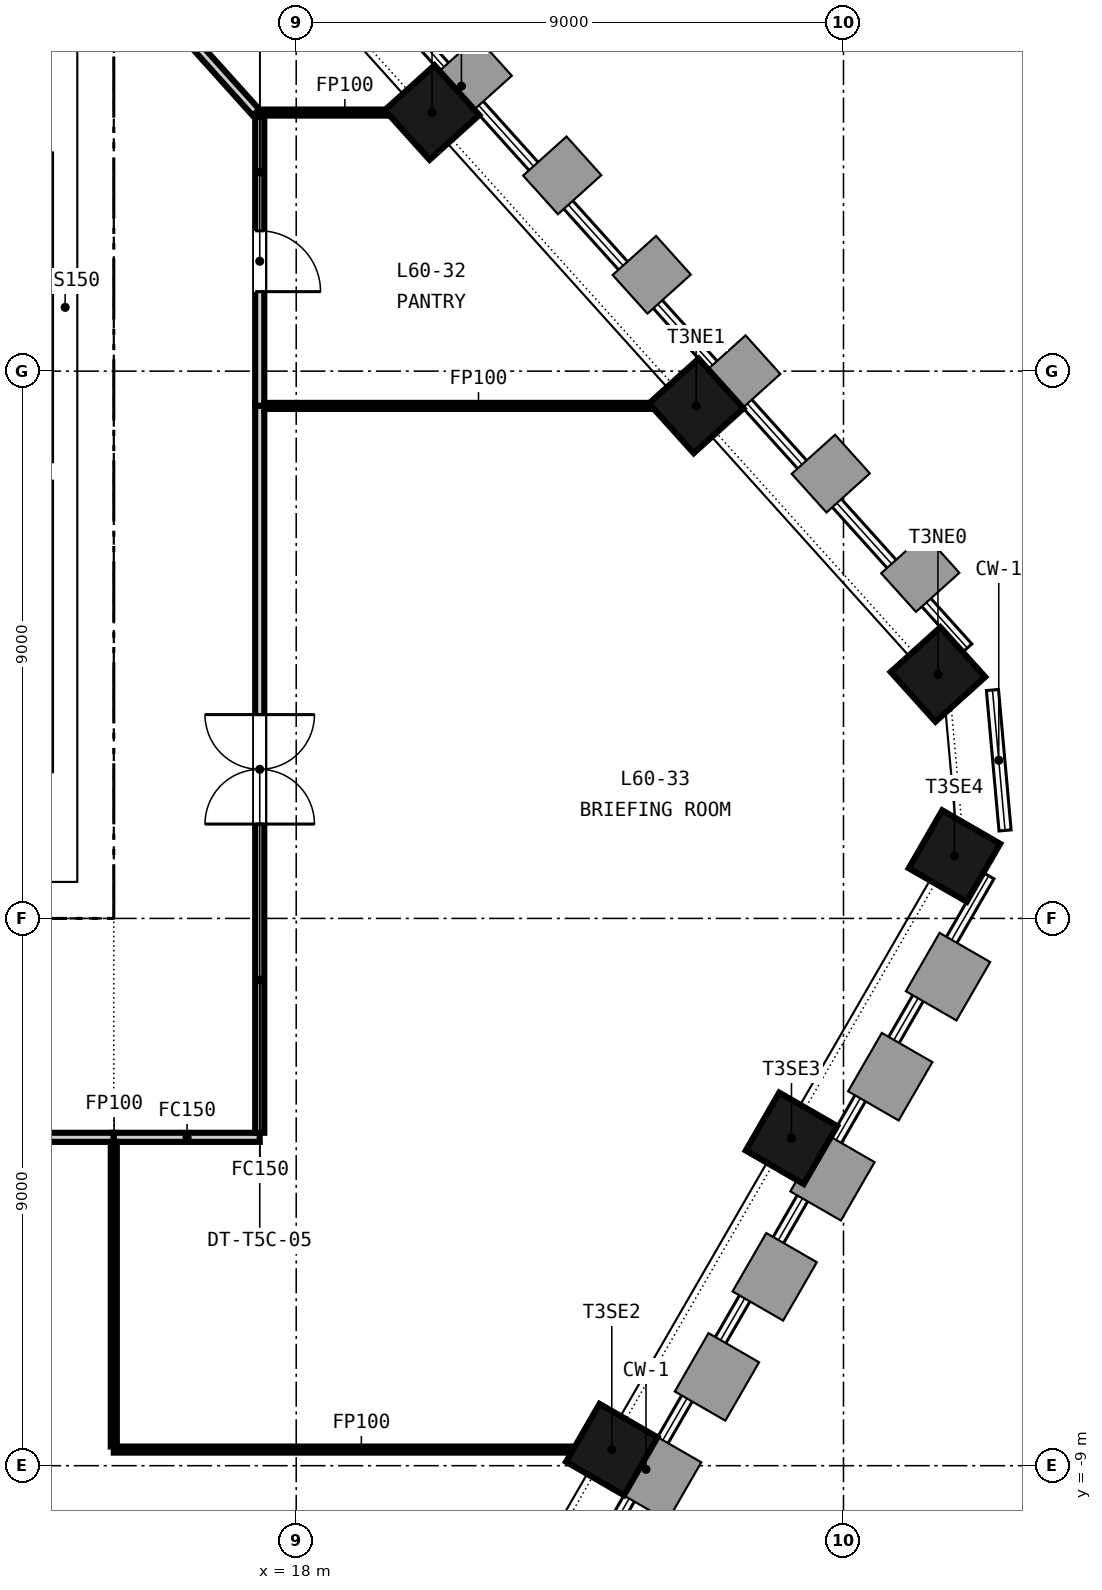
"""IFC4 building model, lengths in metres.
Left out: names, types, materials, properties, quantities, classifications, styles, units other than length and angle.
Written with IfcOpenShell. Run it as: python <this file> out.ifc"""

import sys

from ifc_helpers import new_model, si_unit, direction, frame, frame_2d, origin, origin_2d, place, context, subcontext, project, spatial, rectangle, extrude, element, fill, save


model = new_model("IFC4")
c1 = context("Model", 3, precision=1e-05, world=origin(), true_north=direction((0.0, 1.0)))
c2 = subcontext(c1, "Body", "Model", "MODEL_VIEW")
j1 = project(units=[si_unit("LENGTHUNIT", "METRE"), si_unit("PLANEANGLEUNIT", "RADIAN")], contexts=[c1])
p1 = place(None, origin())
s1 = spatial("IfcSite", under=j1, at=p1, CompositionType="ELEMENT")
p2 = place(p1, origin())
s2 = spatial("IfcBuilding", under=s1, at=p2, CompositionType="ELEMENT")
p3 = place(p2, frame((0.0, 0.0, 238.2)))
s3 = spatial("IfcBuildingStorey", under=s2, at=p3, CompositionType="ELEMENT", Elevation=238.2)
p4 = place(p3, frame((-15.0, 0.3, -0.15), z_axis=(0.0, 0.0, 1.0), x_axis=(1.0, 0.0, 0.0)))
e1 = element("IfcWall", 1, at=p4, inside=s3, PredefinedType="SOLIDWALL", context=c2, shape_type="SweptSolid", body=[
    extrude(rectangle(XDim=30.0, YDim=0.6, at=frame_2d((15.0, 0.0))), origin(), (0.0, 0.0, 1.0), 3.65),
])
p5 = place(p4, frame((5.8, 0.0, 0.15)))
e2 = element("IfcOpeningElement", 2, at=p5, cuts=e1, PredefinedType="OPENING", context=c2, shape_type="SweptSolid", body=[
    extrude(rectangle(XDim=2.4, YDim=2.4, at=frame_2d((1.2, 1.2))), frame((0.0, 0.31, 0.0), z_axis=(0.0, -1.0, 0.0), x_axis=(1.0, 0.0, 0.0)), (0.0, 0.0, 1.0), 0.62),
])
p6 = place(p4, frame((13.8, 0.0, 0.15)))
e3 = element("IfcOpeningElement", 3, at=p6, cuts=e1, PredefinedType="OPENING", context=c2, shape_type="SweptSolid", body=[
    extrude(rectangle(XDim=2.4, YDim=2.4, at=frame_2d((1.2, 1.2))), frame((0.0, 0.31, 0.0), z_axis=(0.0, -1.0, 0.0), x_axis=(1.0, 0.0, 0.0)), (0.0, 0.0, 1.0), 0.62),
])
p7 = place(p4, frame((21.8, 0.0, 0.15)))
e4 = element("IfcOpeningElement", 4, at=p7, cuts=e1, PredefinedType="OPENING", context=c2, shape_type="SweptSolid", body=[
    extrude(rectangle(XDim=2.4, YDim=2.4, at=frame_2d((1.2, 1.2))), frame((0.0, 0.31, 0.0), z_axis=(0.0, -1.0, 0.0), x_axis=(1.0, 0.0, 0.0)), (0.0, 0.0, 1.0), 0.62),
])
p8 = place(p4, frame((1.5, 0.0, 0.15)))
e5 = element("IfcOpeningElement", 5, at=p8, cuts=e1, PredefinedType="OPENING", context=c2, shape_type="SweptSolid", body=[
    extrude(rectangle(XDim=1.2, YDim=2.1, at=frame_2d((0.6, 1.05))), frame((0.0, 0.31, 0.0), z_axis=(0.0, -1.0, 0.0), x_axis=(1.0, 0.0, 0.0)), (0.0, 0.0, 1.0), 0.62),
])
p9 = place(p4, frame((27.3, 0.0, 0.15)))
e6 = element("IfcOpeningElement", 6, at=p9, cuts=e1, PredefinedType="OPENING", context=c2, shape_type="SweptSolid", body=[
    extrude(rectangle(XDim=1.2, YDim=2.1, at=frame_2d((0.6, 1.05))), frame((0.0, 0.31, 0.0), z_axis=(0.0, -1.0, 0.0), x_axis=(1.0, 0.0, 0.0)), (0.0, 0.0, 1.0), 0.62),
])
p10 = place(p3, frame((14.7, 0.6, -0.15), z_axis=(0.0, 0.0, 1.0), x_axis=(0.0, 1.0, 0.0)))
e7 = element("IfcWall", 7, at=p10, inside=s3, PredefinedType="SOLIDWALL", context=c2, shape_type="SweptSolid", body=[
    extrude(rectangle(XDim=13.8, YDim=0.6, at=frame_2d((6.9, 0.0))), origin(), (0.0, 0.0, 1.0), 3.65),
])
for number, where, z_axis, x_axis in (
    (8, (23.189, -8.735, -0.15), (0.0, 0.0, 1.0), (0.5, 0.866, 0.0)),
    (9, (26.145, -3.616, -0.15), (0.0, 0.0, 1.0), (0.5, 0.866, 0.0)),
    (10, (28.825, 1.026, -0.15), (0.0, 0.0, 1.0), (0.5, 0.866, 0.0)),
    (11, (28.553, 4.012, -0.15), (0.0, 0.0, 1.0), (-0.669, 0.743, 0.0)),
    (12, (24.577, 8.427, -0.15), (0.0, 0.0, 1.0), (-0.669, 0.743, 0.0)),
    (13, (20.233, 13.252, -0.15), (0.0, 0.0, 1.0), (-0.669, 0.743, 0.0)),
):
    element("IfcColumn", number, at=place(p3, frame(where, z_axis=z_axis, x_axis=x_axis)), inside=s3, PredefinedType="COLUMN", context=c2, shape_type="SweptSolid", body=[
        extrude(rectangle(XDim=1.1, YDim=1.1, at=origin_2d()), origin(), (0.0, 0.0, 1.0), 3.65),
    ])
p11 = place(p3, frame((11.05, 7.35, 0.0), z_axis=(0.0, 0.0, 1.0), x_axis=(1.0, 0.0, 0.0)))
e14 = element("IfcWall", 14, at=p11, inside=s3, PredefinedType="SOLIDWALL", context=c2, shape_type="SweptSolid", body=[
    extrude(rectangle(XDim=2.95, YDim=0.3, at=frame_2d((1.475, 0.0))), origin(), (0.0, 0.0, 1.0), 3.5),
])
p12 = place(p3, frame((14.2, 0.6, 0.0), z_axis=(0.0, 0.0, 1.0), x_axis=(0.0, 1.0, 0.0)))
e15 = element("IfcWall", 15, at=p12, inside=s3, PredefinedType="SOLIDWALL", context=c2, shape_type="SweptSolid", body=[
    extrude(rectangle(XDim=13.8, YDim=0.4, at=frame_2d((6.9, 0.0))), origin(), (0.0, 0.0, 1.0), 3.5),
])
p13 = place(p3, frame((15.0, -3.6, 0.0), z_axis=(0.0, 0.0, 1.0), x_axis=(-1.0, 0.0, 0.0)))
e16 = element("IfcWall", 16, at=p13, inside=s3, PredefinedType="PARTITIONING", context=c2, shape_type="SweptSolid", body=[
    extrude(rectangle(XDim=30.0, YDim=0.15, at=frame_2d((15.0, 0.0))), origin(), (0.0, 0.0, 1.0), 2.751),
])
p14 = place(p13, frame((14.1, 0.0, 0.0)))
e17 = element("IfcOpeningElement", 17, at=p14, cuts=e16, PredefinedType="OPENING", context=c2, shape_type="SweptSolid", body=[
    extrude(rectangle(XDim=1.8, YDim=2.1, at=frame_2d((0.9, 1.05))), frame((0.0, 0.085, 0.0), z_axis=(0.0, -1.0, 0.0), x_axis=(1.0, 0.0, 0.0)), (0.0, 0.0, 1.0), 0.17),
])
p15 = place(p3, frame((17.4, 13.186, 0.0), z_axis=(0.0, 0.0, 1.0), x_axis=(0.0, -1.0, 0.0)))
e18 = element("IfcWall", 18, at=p15, inside=s3, PredefinedType="PARTITIONING", context=c2, shape_type="SweptSolid", body=[
    extrude(rectangle(XDim=4.758, YDim=0.15, at=frame_2d((2.379, 0.0))), origin(), (0.0, 0.0, 1.0), 2.751),
])
p16 = place(p15, frame((1.879, 0.0, 0.0)))
e19 = element("IfcOpeningElement", 19, at=p16, cuts=e18, PredefinedType="OPENING", context=c2, shape_type="SweptSolid", body=[
    extrude(rectangle(XDim=1.0, YDim=2.1, at=frame_2d((0.5, 1.05))), frame((0.0, 0.085, 0.0), z_axis=(0.0, -1.0, 0.0), x_axis=(1.0, 0.0, 0.0)), (0.0, 0.0, 1.0), 0.17),
])
p17 = place(p3, frame((17.4, -3.6, 0.0), z_axis=(0.0, 0.0, 1.0), x_axis=(-1.0, 0.0, 0.0)))
e20 = element("IfcWall", 20, at=p17, inside=s3, PredefinedType="PARTITIONING", context=c2, shape_type="SweptSolid", body=[
    extrude(rectangle(XDim=2.4, YDim=0.15, at=frame_2d((1.2, 0.0))), origin(), (0.0, 0.0, 1.0), 2.751),
])
p18 = place(p3, frame((17.4, 8.428, 0.0), z_axis=(0.0, 0.0, 1.0), x_axis=(0.0, -1.0, 0.0)))
e21 = element("IfcWall", 21, at=p18, inside=s3, PredefinedType="PARTITIONING", context=c2, shape_type="SweptSolid", body=[
    extrude(rectangle(XDim=11.953, YDim=0.15, at=frame_2d((5.977, 0.0))), origin(), (0.0, 0.0, 1.0), 2.751),
])
p19 = place(p18, frame((5.076, 0.0, 0.0)))
e22 = element("IfcOpeningElement", 22, at=p19, cuts=e21, PredefinedType="OPENING", context=c2, shape_type="SweptSolid", body=[
    extrude(rectangle(XDim=1.8, YDim=2.1, at=frame_2d((0.9, 1.05))), frame((0.0, 0.085, 0.0), z_axis=(0.0, -1.0, 0.0), x_axis=(1.0, 0.0, 0.0)), (0.0, 0.0, 1.0), 0.17),
])
p20 = place(p3, frame((14.476, 16.433, 0.0), z_axis=(0.0, 0.0, 1.0), x_axis=(0.669119130918, -0.74315515785, 0.0)))
e23 = element("IfcWall", 23, at=p20, inside=s3, PredefinedType="PARTITIONING", context=c2, shape_type="SweptSolid", body=[
    extrude(rectangle(XDim=4.28, YDim=0.15, at=frame_2d((2.14, 0.0))), origin(), (0.0, 0.0, 1.0), 2.751),
])
p21 = place(p3, frame((17.423, 13.252, 0.0), z_axis=(0.0, 0.0, 1.0), x_axis=(1.0, 0.0, 0.0)))
e24 = element("IfcWall", 24, at=p21, inside=s3, PredefinedType="PARTITIONING", context=c2, shape_type="SweptSolid", body=[
    extrude(rectangle(XDim=2.743, YDim=0.1, at=frame_2d((1.372, 0.0))), origin(), (0.0, 0.0, 1.0), 2.751),
])
p22 = place(p3, frame((17.475, 8.428, 0.0), z_axis=(0.0, 0.0, 1.0), x_axis=(1.0, 0.0, 0.0)))
e25 = element("IfcWall", 25, at=p22, inside=s3, PredefinedType="PARTITIONING", context=c2, shape_type="SweptSolid", body=[
    extrude(rectangle(XDim=7.035, YDim=0.1, at=frame_2d((3.518, 0.0))), origin(), (0.0, 0.0, 1.0), 2.751),
])
p23 = place(p3, frame((15.0, -8.735, 0.0), z_axis=(0.0, 0.0, 1.0), x_axis=(1.0, 0.0, 0.0)))
e26 = element("IfcWall", 26, at=p23, inside=s3, PredefinedType="PARTITIONING", context=c2, shape_type="SweptSolid", body=[
    extrude(rectangle(XDim=8.132, YDim=0.1, at=frame_2d((4.066, 0.0))), origin(), (0.0, 0.0, 1.0), 2.751),
])
p24 = place(p3, frame((15.0, -8.685, 0.0), z_axis=(0.0, 0.0, 1.0), x_axis=(0.0, 1.0, 0.0)))
e27 = element("IfcWall", 27, at=p24, inside=s3, PredefinedType="PARTITIONING", context=c2, shape_type="SweptSolid", body=[
    extrude(rectangle(XDim=5.01, YDim=0.1, at=frame_2d((2.505, 0.0))), origin(), (0.0, 0.0, 1.0), 2.751),
])
p25 = place(p16, origin())
e28 = element("IfcDoor", 28, at=p25, inside=s3, OperationType="SINGLE_SWING_RIGHT", PredefinedType="DOOR", context=c2, shape_type="SweptSolid", body=[
    extrude(rectangle(XDim=1.0, YDim=2.1, at=frame_2d((0.5, 1.05))), frame((0.0, 0.025, 0.0), z_axis=(0.0, -1.0, 0.0), x_axis=(1.0, 0.0, 0.0)), (0.0, 0.0, 1.0), 0.05),
])
fill(e19, e28)
p26 = place(p19, origin())
e29 = element("IfcDoor", 29, at=p26, inside=s3, OperationType="DOUBLE_DOOR_DOUBLE_SWING", PredefinedType="DOOR", context=c2, shape_type="SweptSolid", body=[
    extrude(rectangle(XDim=1.8, YDim=2.1, at=frame_2d((0.9, 1.05))), frame((0.0, 0.025, 0.0), z_axis=(0.0, -1.0, 0.0), x_axis=(1.0, 0.0, 0.0)), (0.0, 0.0, 1.0), 0.05),
])
fill(e22, e29)
save(model, sys.argv[1])
